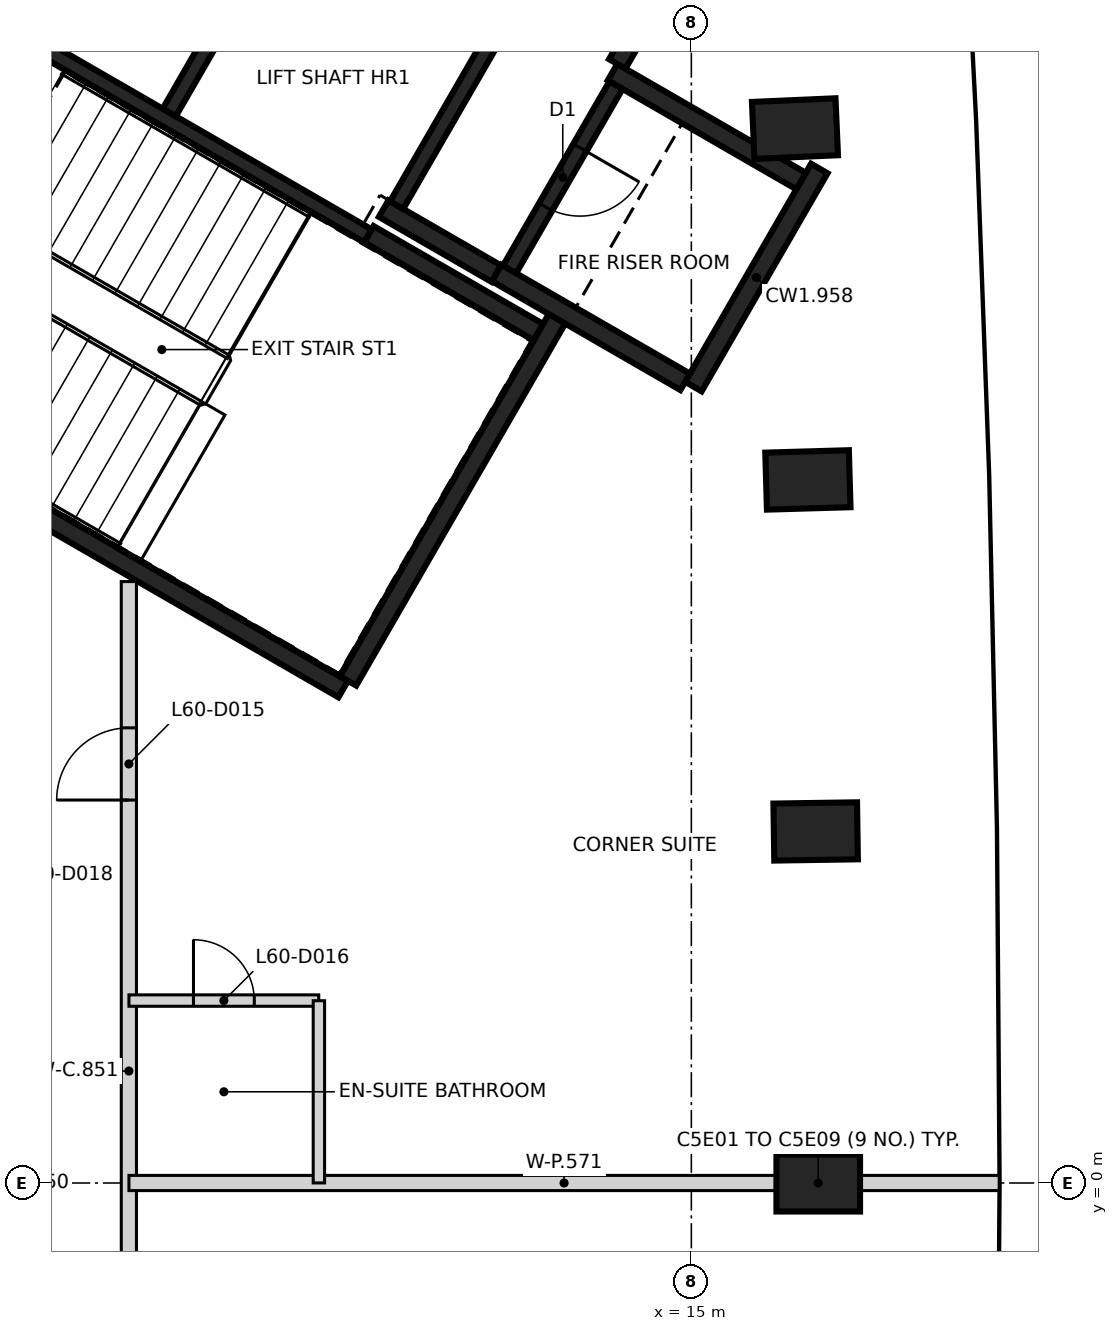
"""IFC4 building model, lengths in metres.
Left out: names, types, materials, properties, quantities, classifications, styles, units other than length and angle.
Written with IfcOpenShell. Run it as: python <this file> out.ifc"""

import sys

from ifc_helpers import new_model, si_unit, direction, frame, frame_2d, origin, origin_2d, place, context, subcontext, project, spatial, rectangle, extrude, element, fill, save


model = new_model("IFC4")
c1 = context("Model", 3, precision=1e-05, world=origin(), true_north=direction((0.0, 1.0)))
c2 = subcontext(c1, "Body", "Model", "MODEL_VIEW")
j1 = project(units=[si_unit("LENGTHUNIT", "METRE"), si_unit("PLANEANGLEUNIT", "RADIAN")], contexts=[c1])
p1 = place(None, origin())
s1 = spatial("IfcSite", under=j1, at=p1, CompositionType="ELEMENT")
p2 = place(p1, origin())
s2 = spatial("IfcBuilding", under=s1, at=p2, CompositionType="ELEMENT")
p3 = place(p2, frame((0.0, 0.0, 239.4)))
s3 = spatial("IfcBuildingStorey", under=s2, at=p3, CompositionType="ELEMENT", Elevation=239.4)
for number, where, z_axis, x_axis in (
    (1, (16.669, 0.0, -0.35), (0.0, 0.0, 1.0), (1.0, 0.0, 0.0)),
    (2, (16.635, 4.625, -0.35), (0.0, 0.0, 1.0), (1.0, 0.015, 0.0)),
    (3, (16.533, 9.25, -0.35), (0.0, 0.0, 1.0), (1.0, 0.029, 0.0)),
    (4, (16.363, 13.872, -0.35), (0.0, 0.0, 1.0), (0.999, 0.044, 0.0)),
):
    element("IfcColumn", number, at=place(p3, frame(where, z_axis=z_axis, x_axis=x_axis)), inside=s3, PredefinedType="COLUMN", context=c2, shape_type="SweptSolid", body=[
        extrude(rectangle(XDim=1.1, YDim=0.75, at=origin_2d()), origin(), (0.0, 0.0, 1.0), 3.6),
    ])
p4 = place(p3, frame((10.42, 6.498, 0.0), z_axis=(0.0, 0.0, 1.0), x_axis=(-0.866021906294, 0.500006057782, 0.0)))
e5 = element("IfcWall", 5, at=p4, inside=s3, PredefinedType="SHEAR", context=c2, shape_type="SweptSolid", body=[
    extrude(rectangle(XDim=11.55, YDim=0.25, at=frame_2d((5.775, 0.0))), origin(), (0.0, 0.0, 1.0), 3.25),
])
p5 = place(p4, frame((10.025, 0.0, 0.0)))
e6 = element("IfcOpeningElement", 6, at=p5, cuts=e5, PredefinedType="OPENING", context=c2, shape_type="SweptSolid", body=[
    extrude(rectangle(XDim=1.2, YDim=2.1, at=frame_2d((0.6, 1.05))), frame((0.0, 0.135, 0.0), z_axis=(0.0, -1.0, 0.0), x_axis=(1.0, 0.0, 0.0)), (0.0, 0.0, 1.0), 0.27),
])
p6 = place(p4, frame((8.725, 0.0, 0.0)))
e7 = element("IfcOpeningElement", 7, at=p6, cuts=e5, PredefinedType="OPENING", context=c2, shape_type="SweptSolid", body=[
    extrude(rectangle(XDim=1.2, YDim=2.1, at=frame_2d((0.6, 1.05))), frame((0.0, 0.135, 0.0), z_axis=(0.0, -1.0, 0.0), x_axis=(1.0, 0.0, 0.0)), (0.0, 0.0, 1.0), 0.27),
])
p7 = place(p3, frame((13.238, 11.378, 0.0), z_axis=(0.0, 0.0, 1.0), x_axis=(-0.500008851346, -0.866020293397, 0.0)))
e8 = element("IfcWall", 8, at=p7, inside=s3, PredefinedType="SHEAR", context=c2, shape_type="SweptSolid", body=[
    extrude(rectangle(XDim=5.51, YDim=0.25, at=frame_2d((2.755, 0.0))), origin(), (0.0, 0.0, 1.0), 3.25),
])
p8 = place(p3, frame((16.684, 13.347, 0.0), z_axis=(0.0, 0.0, 1.0), x_axis=(-0.499998874531, -0.866026053573, 0.0)))
e9 = element("IfcWall", 9, at=p8, inside=s3, PredefinedType="SHEAR", context=c2, shape_type="SweptSolid", body=[
    extrude(rectangle(XDim=3.313, YDim=0.25, at=frame_2d((1.656, 0.0))), origin(), (0.0, 0.0, 1.0), 3.25),
])
p9 = place(p3, frame((14.918, 10.54, 0.0), z_axis=(0.0, 0.0, 1.0), x_axis=(-0.866063538972, 0.499933942099, 0.0)))
e10 = element("IfcWall", 10, at=p9, inside=s3, PredefinedType="SHEAR", context=c2, shape_type="SweptSolid", body=[
    extrude(rectangle(XDim=2.865, YDim=0.25, at=frame_2d((1.432, 0.0))), origin(), (0.0, 0.0, 1.0), 3.25),
])
p10 = place(p3, frame((13.963, 14.614, 0.0), z_axis=(0.0, 0.0, 1.0), x_axis=(0.866042235819, -0.499970844928, 0.0)))
e11 = element("IfcWall", 11, at=p10, inside=s3, PredefinedType="SHEAR", context=c2, shape_type="SweptSolid", body=[
    extrude(rectangle(XDim=2.865, YDim=0.25, at=frame_2d((1.432, 0.0))), origin(), (0.0, 0.0, 1.0), 3.25),
])
p11 = place(p3, frame((10.757, 12.481, 0.0), z_axis=(0.0, 0.0, 1.0), x_axis=(0.866022940537, -0.500004266446, 0.0)))
e12 = element("IfcWall", 12, at=p11, inside=s3, PredefinedType="SHEAR", context=c2, shape_type="SweptSolid", body=[
    extrude(rectangle(XDim=2.575, YDim=0.25, at=frame_2d((1.287, 0.0))), origin(), (0.0, 0.0, 1.0), 3.25),
])
p12 = place(p3, frame((12.433, 11.964, 0.0), z_axis=(0.0, 0.0, 1.0), x_axis=(-0.866038183914, 0.499977863513, 0.0)))
e13 = element("IfcWall", 13, at=p12, inside=s3, PredefinedType="SHEAR", context=c2, shape_type="SweptSolid", body=[
    extrude(rectangle(XDim=1.71, YDim=0.25, at=frame_2d((0.855, 0.0))), origin(), (0.0, 0.0, 1.0), 3.25),
])
p13 = place(p3, frame((14.305, 15.207, 0.0), z_axis=(0.0, 0.0, 1.0), x_axis=(-0.499848422343, -0.866112899501, 0.0)))
e14 = element("IfcWall", 14, at=p13, inside=s3, PredefinedType="SHEAR", context=c2, shape_type="SweptSolid", body=[
    extrude(rectangle(XDim=0.559, YDim=0.25, at=frame_2d((0.28, 0.0))), origin(), (0.0, 0.0, 1.0), 3.25),
])
p14 = place(p3, frame((10.743, 12.46, 0.0), z_axis=(0.0, 0.0, 1.0), x_axis=(-0.866018848283, 0.500011354289, 0.0)))
e15 = element("IfcWall", 15, at=p14, inside=s3, PredefinedType="SHEAR", context=c2, shape_type="SweptSolid", body=[
    extrude(rectangle(XDim=5.974, YDim=0.2, at=frame_2d((2.987, 0.0))), origin(), (0.0, 0.0, 1.0), 3.25),
])
p15 = place(p3, frame((8.132, 14.084, 0.0), z_axis=(0.0, 0.0, 1.0), x_axis=(0.500030834389, 0.86600760081, 0.0)))
e16 = element("IfcWall", 16, at=p15, inside=s3, PredefinedType="SHEAR", context=c2, shape_type="SweptSolid", body=[
    extrude(rectangle(XDim=3.198, YDim=0.2, at=frame_2d((1.599, 0.0))), origin(), (0.0, 0.0, 1.0), 3.25),
])
p16 = place(p3, frame((14.008, 14.442, 0.0), z_axis=(0.0, 0.0, 1.0), x_axis=(-0.499986818241, -0.866033014143, 0.0)))
e17 = element("IfcWall", 17, at=p16, inside=s3, PredefinedType="SHEAR", context=c2, shape_type="SweptSolid", body=[
    extrude(rectangle(XDim=2.798, YDim=0.2, at=frame_2d((1.399, 0.0))), origin(), (0.0, 0.0, 1.0), 3.25),
])
p17 = place(p16, frame((0.949, 0.0, 0.0)))
e18 = element("IfcOpeningElement", 18, at=p17, cuts=e17, PredefinedType="OPENING", context=c2, shape_type="SweptSolid", body=[
    extrude(rectangle(XDim=0.9, YDim=2.1, at=frame_2d((0.45, 1.05))), frame((0.0, 0.11, 0.0), z_axis=(0.0, -1.0, 0.0), x_axis=(1.0, 0.0, 0.0)), (0.0, 0.0, 1.0), 0.22),
])
p18 = place(p3, frame((12.502, 15.255, 0.0), z_axis=(0.0, 0.0, 1.0), x_axis=(-0.499965018551, -0.866045599391, 0.0)))
e19 = element("IfcWall", 19, at=p18, inside=s3, PredefinedType="SHEAR", context=c2, shape_type="SweptSolid", body=[
    extrude(rectangle(XDim=2.759, YDim=0.2, at=frame_2d((1.379, 0.0))), origin(), (0.0, 0.0, 1.0), 3.25),
])
p19 = place(p3, frame((7.6, -4.966, 0.0), z_axis=(0.0, 0.0, 1.0), x_axis=(0.0, 1.0, 0.0)))
e20 = element("IfcWall", 20, at=p19, inside=s3, PredefinedType="PARTITIONING", context=c2, shape_type="SweptSolid", body=[
    extrude(rectangle(XDim=12.878, YDim=0.2, at=frame_2d((6.439, 0.0))), origin(), (0.0, 0.0, 1.0), 3.25),
])
p20 = place(p19, frame((10.004, 0.0, 0.0)))
e21 = element("IfcOpeningElement", 21, at=p20, cuts=e20, PredefinedType="OPENING", context=c2, shape_type="SweptSolid", body=[
    extrude(rectangle(XDim=0.95, YDim=2.1, at=frame_2d((0.475, 1.05))), frame((0.0, 0.11, 0.0), z_axis=(0.0, -1.0, 0.0), x_axis=(1.0, 0.0, 0.0)), (0.0, 0.0, 1.0), 0.22),
])
p21 = place(p3, frame((7.601, 0.0, 0.0), z_axis=(0.0, 0.0, 1.0), x_axis=(1.0, 0.0, 0.0)))
e22 = element("IfcWall", 22, at=p21, inside=s3, PredefinedType="PARTITIONING", context=c2, shape_type="SweptSolid", body=[
    extrude(rectangle(XDim=11.449, YDim=0.2, at=frame_2d((5.725, 0.0))), origin(), (0.0, 0.0, 1.0), 3.25),
])
p22 = place(p3, frame((7.601, 2.4, 0.0), z_axis=(0.0, 0.0, 1.0), x_axis=(1.0, 0.0, 0.0)))
e23 = element("IfcWall", 23, at=p22, inside=s3, PredefinedType="PARTITIONING", context=c2, shape_type="SweptSolid", body=[
    extrude(rectangle(XDim=2.497, YDim=0.15, at=frame_2d((1.249, 0.0))), origin(), (0.0, 0.0, 1.0), 3.25),
])
p23 = place(p22, frame((0.849, 0.0, 0.0)))
e24 = element("IfcOpeningElement", 24, at=p23, cuts=e23, PredefinedType="OPENING", context=c2, shape_type="SweptSolid", body=[
    extrude(rectangle(XDim=0.8, YDim=2.1, at=frame_2d((0.4, 1.05))), frame((0.0, 0.085, 0.0), z_axis=(0.0, -1.0, 0.0), x_axis=(1.0, 0.0, 0.0)), (0.0, 0.0, 1.0), 0.17),
])
p24 = place(p3, frame((10.1, 0.001, 0.0), z_axis=(0.0, 0.0, 1.0), x_axis=(0.0, 1.0, 0.0)))
e25 = element("IfcWall", 25, at=p24, inside=s3, PredefinedType="PARTITIONING", context=c2, shape_type="SweptSolid", body=[
    extrude(rectangle(XDim=2.397, YDim=0.15, at=frame_2d((1.198, 0.0))), origin(), (0.0, 0.0, 1.0), 3.25),
])
p25 = place(p17, origin())
e26 = element("IfcDoor", 26, at=p25, inside=s3, OperationType="SINGLE_SWING_RIGHT", PredefinedType="DOOR", context=c2, shape_type="SweptSolid", body=[
    extrude(rectangle(XDim=0.9, YDim=2.1, at=frame_2d((0.45, 1.05))), frame((0.0, 0.025, 0.0), z_axis=(0.0, -1.0, 0.0), x_axis=(1.0, 0.0, 0.0)), (0.0, 0.0, 1.0), 0.05),
])
fill(e18, e26)
p26 = place(p20, frame((0.95, 0.0, 0.0), z_axis=(0.0, 0.0, 1.0), x_axis=(-1.0, 0.0, 0.0)))
e27 = element("IfcDoor", 27, at=p26, inside=s3, OperationType="SINGLE_SWING_LEFT", PredefinedType="DOOR", context=c2, shape_type="SweptSolid", body=[
    extrude(rectangle(XDim=0.95, YDim=2.1, at=frame_2d((0.475, 1.05))), frame((0.0, 0.025, 0.0), z_axis=(0.0, -1.0, 0.0), x_axis=(1.0, 0.0, 0.0)), (0.0, 0.0, 1.0), 0.05),
])
fill(e21, e27)
p27 = place(p23, origin())
e28 = element("IfcDoor", 28, at=p27, inside=s3, OperationType="SINGLE_SWING_LEFT", PredefinedType="DOOR", context=c2, shape_type="SweptSolid", body=[
    extrude(rectangle(XDim=0.8, YDim=2.1, at=frame_2d((0.4, 1.05))), frame((0.0, 0.025, 0.0), z_axis=(0.0, -1.0, 0.0), x_axis=(1.0, 0.0, 0.0)), (0.0, 0.0, 1.0), 0.05),
])
fill(e24, e28)
save(model, sys.argv[1])
